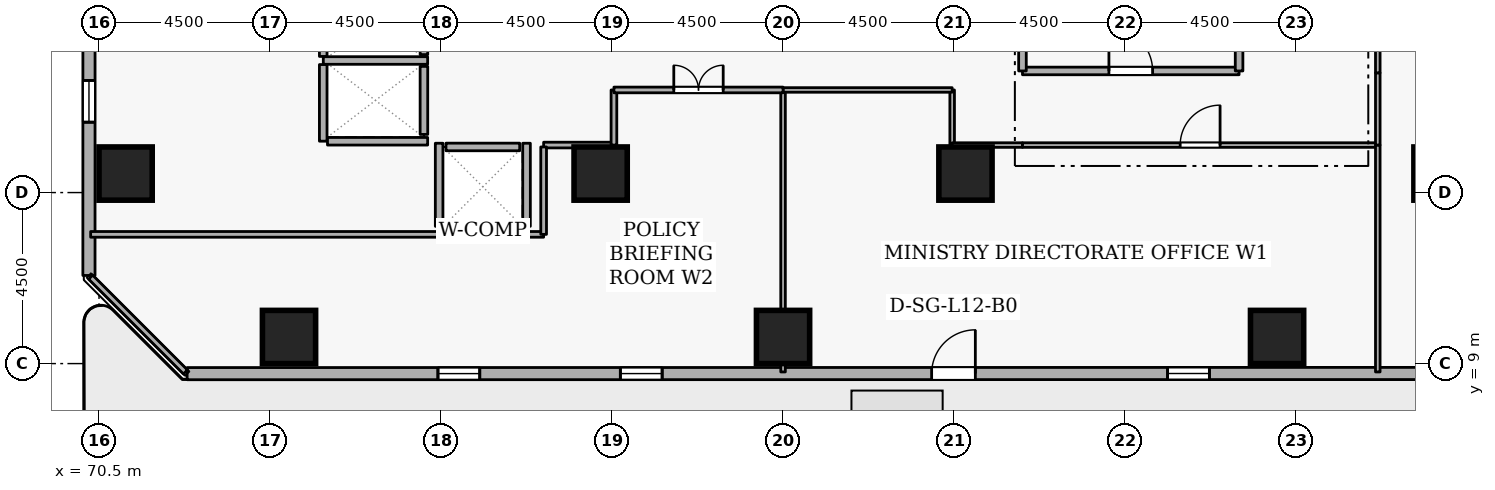
"""IFC4 building model, lengths in metres.
Left out: names, types, materials, properties, quantities, classifications, styles, units other than length and angle.
Written with IfcOpenShell. Run it as: python <this file> out.ifc"""

import sys

from ifc_helpers import new_model, si_unit, direction, frame, frame_2d, origin, origin_2d, place, context, subcontext, project, spatial, rectangle, extrude, element, fill, save


model = new_model("IFC4")
c1 = context("Model", 3, precision=1e-05, world=origin(), true_north=direction((0.0, 1.0)))
c2 = subcontext(c1, "Body", "Model", "MODEL_VIEW")
j1 = project(units=[si_unit("LENGTHUNIT", "METRE"), si_unit("PLANEANGLEUNIT", "RADIAN")], contexts=[c1])
p1 = place(None, origin())
s1 = spatial("IfcSite", under=j1, at=p1, CompositionType="ELEMENT")
p2 = place(p1, origin())
s2 = spatial("IfcBuilding", under=s1, at=p2, CompositionType="ELEMENT")
p3 = place(p2, frame((0.0, 0.0, 49.5)))
s3 = spatial("IfcBuildingStorey", under=s2, at=p3, CompositionType="ELEMENT", Elevation=49.5)
for number, where, z_axis, x_axis in (
    (1, (105.8, 14.0, 0.0), (0.0, 0.0, 1.0), (1.0, 0.0, 0.0)),
    (2, (71.2, 14.0, 0.0), (0.0, 0.0, 1.0), (1.0, 0.0, 0.0)),
    (3, (101.5, 9.7, 0.0), (0.0, 0.0, 1.0), (1.0, 0.0, 0.0)),
    (4, (88.5, 9.7, 0.0), (0.0, 0.0, 1.0), (1.0, 0.0, 0.0)),
    (5, (75.5, 9.7, 0.0), (0.0, 0.0, 1.0), (1.0, 0.0, 0.0)),
    (6, (93.3, 14.0, 0.0), (0.0, 0.0, 1.0), (1.0, 0.0, 0.0)),
    (7, (83.7, 14.0, 0.0), (0.0, 0.0, 1.0), (1.0, 0.0, 0.0)),
):
    element("IfcColumn", number, at=place(p3, frame(where, z_axis=z_axis, x_axis=x_axis)), inside=s3, PredefinedType="COLUMN", context=c2, shape_type="SweptSolid", body=[
        extrude(rectangle(XDim=1.4, YDim=1.4, at=origin_2d()), origin(), (0.0, 0.0, 1.0), 4.2),
    ])
p4 = place(p3, frame((72.819, 8.735, 0.0), z_axis=(0.0, 0.0, 1.0), x_axis=(0.999999988703, 0.000150313265, 0.0)))
e8 = element("IfcWall", 8, at=p4, inside=s3, PredefinedType="STANDARD", context=c2, shape_type="SweptSolid", body=[
    extrude(rectangle(XDim=35.733, YDim=0.32, at=frame_2d((17.866, 0.0))), origin(), (0.0, 0.0, 1.0), 3.3),
])
p5 = place(p4, frame((19.591, 0.0, 0.0)))
e9 = element("IfcOpeningElement", 9, at=p5, cuts=e8, PredefinedType="OPENING", context=c2, shape_type="SweptSolid", body=[
    extrude(rectangle(XDim=1.15, YDim=2.1, at=frame_2d((0.575, 1.05))), frame((0.0, 0.17, 0.0), z_axis=(0.0, -1.0, 0.0), x_axis=(1.0, 0.0, 0.0)), (0.0, 0.0, 1.0), 0.34),
])
p6 = place(p4, frame((6.6, 0.0, 0.72)))
e10 = element("IfcOpeningElement", 10, at=p6, cuts=e8, PredefinedType="OPENING", context=c2, shape_type="SweptSolid", body=[
    extrude(rectangle(XDim=1.1, YDim=1.8, at=frame_2d((0.55, 0.9))), frame((0.0, 0.17, 0.0), z_axis=(0.0, -1.0, 0.0), x_axis=(1.0, 0.0, 0.0)), (0.0, 0.0, 1.0), 0.34),
])
p7 = place(p4, frame((11.4, 0.0, 0.72)))
e11 = element("IfcOpeningElement", 11, at=p7, cuts=e8, PredefinedType="OPENING", context=c2, shape_type="SweptSolid", body=[
    extrude(rectangle(XDim=1.1, YDim=1.8, at=frame_2d((0.55, 0.9))), frame((0.0, 0.17, 0.0), z_axis=(0.0, -1.0, 0.0), x_axis=(1.0, 0.0, 0.0)), (0.0, 0.0, 1.0), 0.34),
])
p8 = place(p4, frame((25.8, 0.0, 0.72)))
e12 = element("IfcOpeningElement", 12, at=p8, cuts=e8, PredefinedType="OPENING", context=c2, shape_type="SweptSolid", body=[
    extrude(rectangle(XDim=1.1, YDim=1.8, at=frame_2d((0.55, 0.9))), frame((0.0, 0.17, 0.0), z_axis=(0.0, -1.0, 0.0), x_axis=(1.0, 0.0, 0.0)), (0.0, 0.0, 1.0), 0.34),
])
p9 = place(p3, frame((70.24, 47.052, 0.0), z_axis=(0.0, 0.0, 1.0), x_axis=(-0.000150313265, -0.999999988703, 0.0)))
e13 = element("IfcWall", 13, at=p9, inside=s3, PredefinedType="STANDARD", context=c2, shape_type="SweptSolid", body=[
    extrude(rectangle(XDim=35.733, YDim=0.32, at=frame_2d((17.866, 0.0))), origin(), (0.0, 0.0, 1.0), 3.3),
])
p10 = place(p9, frame((1.8, 0.0, 0.72)))
e14 = element("IfcOpeningElement", 14, at=p10, cuts=e13, PredefinedType="OPENING", context=c2, shape_type="SweptSolid", body=[
    extrude(rectangle(XDim=1.1, YDim=1.8, at=frame_2d((0.55, 0.9))), frame((0.0, 0.17, 0.0), z_axis=(0.0, -1.0, 0.0), x_axis=(1.0, 0.0, 0.0)), (0.0, 0.0, 1.0), 0.34),
])
p11 = place(p9, frame((11.4, 0.0, 0.72)))
e15 = element("IfcOpeningElement", 15, at=p11, cuts=e13, PredefinedType="OPENING", context=c2, shape_type="SweptSolid", body=[
    extrude(rectangle(XDim=1.1, YDim=1.8, at=frame_2d((0.55, 0.9))), frame((0.0, 0.17, 0.0), z_axis=(0.0, -1.0, 0.0), x_axis=(1.0, 0.0, 0.0)), (0.0, 0.0, 1.0), 0.34),
])
p12 = place(p9, frame((16.2, 0.0, 0.72)))
e16 = element("IfcOpeningElement", 16, at=p12, cuts=e13, PredefinedType="OPENING", context=c2, shape_type="SweptSolid", body=[
    extrude(rectangle(XDim=1.1, YDim=1.8, at=frame_2d((0.55, 0.9))), frame((0.0, 0.17, 0.0), z_axis=(0.0, -1.0, 0.0), x_axis=(1.0, 0.0, 0.0)), (0.0, 0.0, 1.0), 0.34),
])
p13 = place(p9, frame((25.8, 0.0, 0.72)))
e17 = element("IfcOpeningElement", 17, at=p13, cuts=e13, PredefinedType="OPENING", context=c2, shape_type="SweptSolid", body=[
    extrude(rectangle(XDim=1.1, YDim=1.8, at=frame_2d((0.55, 0.9))), frame((0.0, 0.17, 0.0), z_axis=(0.0, -1.0, 0.0), x_axis=(1.0, 0.0, 0.0)), (0.0, 0.0, 1.0), 0.34),
])
p14 = place(p9, frame((30.6, 0.0, 0.72)))
e18 = element("IfcOpeningElement", 18, at=p14, cuts=e13, PredefinedType="OPENING", context=c2, shape_type="SweptSolid", body=[
    extrude(rectangle(XDim=1.1, YDim=1.8, at=frame_2d((0.55, 0.9))), frame((0.0, 0.17, 0.0), z_axis=(0.0, -1.0, 0.0), x_axis=(1.0, 0.0, 0.0)), (0.0, 0.0, 1.0), 0.34),
])
p15 = place(p3, frame((79.05, 17.13, 0.0), z_axis=(0.0, 0.0, 1.0), x_axis=(0.0, 1.0, 0.0)))
e19 = element("IfcWall", 19, at=p15, inside=s3, PredefinedType="STANDARD", context=c2, shape_type="SweptSolid", body=[
    extrude(rectangle(XDim=1.74, YDim=0.2, at=frame_2d((0.87, 0.0))), origin(), (0.0, 0.0, 1.0), 3.94),
])
p16 = place(p3, frame((79.05, 15.03, 0.0), z_axis=(0.0, 0.0, 1.0), x_axis=(0.0, 1.0, 0.0)))
e20 = element("IfcWall", 20, at=p16, inside=s3, PredefinedType="STANDARD", context=c2, shape_type="SweptSolid", body=[
    extrude(rectangle(XDim=1.79, YDim=0.2, at=frame_2d((0.895, 0.0))), origin(), (0.0, 0.0, 1.0), 3.94),
])
p17 = place(p3, frame((79.63, 14.7, 0.0), z_axis=(0.0, 0.0, 1.0), x_axis=(1.0, 0.0, 0.0)))
e21 = element("IfcWall", 21, at=p17, inside=s3, PredefinedType="STANDARD", context=c2, shape_type="SweptSolid", body=[
    extrude(rectangle(XDim=1.94, YDim=0.2, at=frame_2d((0.97, 0.0))), origin(), (0.0, 0.0, 1.0), 3.94),
])
p18 = place(p3, frame((76.402, 16.975, 0.0), z_axis=(0.0, 0.0, 1.0), x_axis=(1.0, 0.0, 0.0)))
e22 = element("IfcWall", 22, at=p18, inside=s3, PredefinedType="STANDARD", context=c2, shape_type="SweptSolid", body=[
    extrude(rectangle(XDim=2.746, YDim=0.2, at=frame_2d((1.373, 0.0))), origin(), (0.0, 0.0, 1.0), 3.94),
])
p19 = place(p3, frame((76.4, 14.852, 0.0), z_axis=(0.0, 0.0, 1.0), x_axis=(0.0, 1.0, 0.0)))
e23 = element("IfcWall", 23, at=p19, inside=s3, PredefinedType="STANDARD", context=c2, shape_type="SweptSolid", body=[
    extrude(rectangle(XDim=2.016, YDim=0.2, at=frame_2d((1.008, 0.0))), origin(), (0.0, 0.0, 1.0), 3.94),
])
p20 = place(p3, frame((76.4, 17.082, 0.0), z_axis=(0.0, 0.0, 1.0), x_axis=(0.0, 1.0, 0.0)))
e24 = element("IfcWall", 24, at=p20, inside=s3, PredefinedType="STANDARD", context=c2, shape_type="SweptSolid", body=[
    extrude(rectangle(XDim=1.856, YDim=0.2, at=frame_2d((0.928, 0.0))), origin(), (0.0, 0.0, 1.0), 3.94),
])
p21 = place(p3, frame((76.512, 14.85, 0.0), z_axis=(0.0, 0.0, 1.0), x_axis=(1.0, 0.0, 0.0)))
e25 = element("IfcWall", 25, at=p21, inside=s3, PredefinedType="STANDARD", context=c2, shape_type="SweptSolid", body=[
    extrude(rectangle(XDim=2.636, YDim=0.2, at=frame_2d((1.318, 0.0))), origin(), (0.0, 0.0, 1.0), 3.94),
])
p22 = place(p3, frame((79.452, 12.5, 0.0), z_axis=(0.0, 0.0, 1.0), x_axis=(1.0, 0.0, 0.0)))
e26 = element("IfcWall", 26, at=p22, inside=s3, PredefinedType="STANDARD", context=c2, shape_type="SweptSolid", body=[
    extrude(rectangle(XDim=2.296, YDim=0.2, at=frame_2d((1.148, 0.0))), origin(), (0.0, 0.0, 1.0), 3.94),
])
for number, where, z_axis, x_axis in (
    (27, (81.75, 12.612, 0.0), (0.0, 0.0, 1.0), (0.0, 1.0, 0.0)),
    (28, (79.45, 12.612, 0.0), (0.0, 0.0, 1.0), (0.0, 1.0, 0.0)),
):
    element("IfcWall", number, at=place(p3, frame(where, z_axis=z_axis, x_axis=x_axis)), inside=s3, PredefinedType="STANDARD", context=c2, shape_type="SweptSolid", body=[
        extrude(rectangle(XDim=2.186, YDim=0.2, at=frame_2d((1.093, 0.0))), origin(), (0.0, 0.0, 1.0), 3.94),
    ])
p23 = place(p3, frame((94.8, 16.7, 0.0), z_axis=(0.0, 0.0, 1.0), x_axis=(1.0, 0.0, 0.0)))
e29 = element("IfcWall", 29, at=p23, inside=s3, PredefinedType="STANDARD", context=c2, shape_type="SweptSolid", body=[
    extrude(rectangle(XDim=5.7, YDim=0.2, at=frame_2d((2.85, 0.0))), origin(), (0.0, 0.0, 1.0), 3.94),
])
p24 = place(p23, frame((2.275, 0.0, 0.0)))
e30 = element("IfcOpeningElement", 30, at=p24, cuts=e29, PredefinedType="OPENING", context=c2, shape_type="SweptSolid", body=[
    extrude(rectangle(XDim=1.15, YDim=2.1, at=frame_2d((0.575, 1.05))), frame((0.0, 0.11, 0.0), z_axis=(0.0, -1.0, 0.0), x_axis=(1.0, 0.0, 0.0)), (0.0, 0.0, 1.0), 0.22),
])
for number, where, z_axis, x_axis in (
    (31, (100.5, 16.7, 0.0), (0.0, 0.0, 1.0), (0.0, 1.0, 0.0)),
    (32, (94.8, 19.2, 0.0), (0.0, 0.0, 1.0), (0.0, -1.0, 0.0)),
):
    element("IfcWall", number, at=place(p3, frame(where, z_axis=z_axis, x_axis=x_axis)), inside=s3, PredefinedType="STANDARD", context=c2, shape_type="SweptSolid", body=[
        extrude(rectangle(XDim=2.5, YDim=0.2, at=frame_2d((1.25, 0.0))), origin(), (0.0, 0.0, 1.0), 3.94),
    ])
p25 = place(p3, frame((92.95, 16.2, 0.0), z_axis=(0.0, 0.0, 1.0), x_axis=(0.0, -1.0, 0.0)))
e33 = element("IfcWall", 33, at=p25, inside=s3, PredefinedType="PARTITIONING", context=c2, shape_type="SweptSolid", body=[
    extrude(rectangle(XDim=1.45, YDim=0.12, at=frame_2d((0.725, 0.0))), origin(), (0.0, 0.0, 1.0), 3.94),
])
p26 = place(p3, frame((92.95, 14.75, 0.0), z_axis=(0.0, 0.0, 1.0), x_axis=(1.0, 0.0, 0.0)))
e34 = element("IfcWall", 34, at=p26, inside=s3, PredefinedType="PARTITIONING", context=c2, shape_type="SweptSolid", body=[
    extrude(rectangle(XDim=1.85, YDim=0.12, at=frame_2d((0.925, 0.0))), origin(), (0.0, 0.0, 1.0), 3.94),
])
p27 = place(p3, frame((94.8, 14.75, 0.0), z_axis=(0.0, 0.0, 1.0), x_axis=(1.0, 0.0, 0.0)))
e35 = element("IfcWall", 35, at=p27, inside=s3, PredefinedType="PARTITIONING", context=c2, shape_type="SweptSolid", body=[
    extrude(rectangle(XDim=9.35, YDim=0.12, at=frame_2d((4.675, 0.0))), origin(), (0.0, 0.0, 1.0), 3.94),
])
p28 = place(p27, frame((4.15, 0.0, 0.0)))
e36 = element("IfcOpeningElement", 36, at=p28, cuts=e35, PredefinedType="OPENING", context=c2, shape_type="SweptSolid", body=[
    extrude(rectangle(XDim=1.05, YDim=2.1, at=frame_2d((0.525, 1.05))), frame((0.0, 0.07, 0.0), z_axis=(0.0, -1.0, 0.0), x_axis=(1.0, 0.0, 0.0)), (0.0, 0.0, 1.0), 0.14),
])
p29 = place(p3, frame((104.15, 14.75, 0.0), z_axis=(0.0, 0.0, 1.0), x_axis=(0.0, -1.0, 0.0)))
e37 = element("IfcWall", 37, at=p29, inside=s3, PredefinedType="PARTITIONING", context=c2, shape_type="SweptSolid", body=[
    extrude(rectangle(XDim=5.97, YDim=0.12, at=frame_2d((2.985, 0.0))), origin(), (0.0, 0.0, 1.0), 3.94),
])
p30 = place(p3, frame((88.5, 8.78, 0.0), z_axis=(0.0, 0.0, 1.0), x_axis=(0.0, 1.0, 0.0)))
e38 = element("IfcWall", 38, at=p30, inside=s3, PredefinedType="PARTITIONING", context=c2, shape_type="SweptSolid", body=[
    extrude(rectangle(XDim=7.42, YDim=0.12, at=frame_2d((3.71, 0.0))), origin(), (0.0, 0.0, 1.0), 3.532),
])
p31 = place(p3, frame((88.5, 16.2, 0.0), z_axis=(0.0, 0.0, 1.0), x_axis=(1.0, 0.0, 0.0)))
e39 = element("IfcWall", 39, at=p31, inside=s3, PredefinedType="PARTITIONING", context=c2, shape_type="SweptSolid", body=[
    extrude(rectangle(XDim=4.45, YDim=0.12, at=frame_2d((2.225, 0.0))), origin(), (0.0, 0.0, 1.0), 3.94),
])
p32 = place(p3, frame((82.2, 14.75, 0.0), z_axis=(0.0, 0.0, 1.0), x_axis=(1.0, 0.0, 0.0)))
e40 = element("IfcWall", 40, at=p32, inside=s3, PredefinedType="PARTITIONING", context=c2, shape_type="SweptSolid", body=[
    extrude(rectangle(XDim=1.85, YDim=0.15, at=frame_2d((0.925, 0.0))), origin(), (0.0, 0.0, 1.0), 3.94),
])
p33 = place(p3, frame((84.05, 14.75, 0.0), z_axis=(0.0, 0.0, 1.0), x_axis=(0.0, 1.0, 0.0)))
e41 = element("IfcWall", 41, at=p33, inside=s3, PredefinedType="PARTITIONING", context=c2, shape_type="SweptSolid", body=[
    extrude(rectangle(XDim=1.45, YDim=0.15, at=frame_2d((0.725, 0.0))), origin(), (0.0, 0.0, 1.0), 3.94),
])
p34 = place(p3, frame((84.05, 16.2, 0.0), z_axis=(0.0, 0.0, 1.0), x_axis=(1.0, 0.0, 0.0)))
e42 = element("IfcWall", 42, at=p34, inside=s3, PredefinedType="PARTITIONING", context=c2, shape_type="SweptSolid", body=[
    extrude(rectangle(XDim=4.45, YDim=0.15, at=frame_2d((2.225, 0.0))), origin(), (0.0, 0.0, 1.0), 3.94),
])
p35 = place(p34, frame((1.575, 0.0, 0.0)))
e43 = element("IfcOpeningElement", 43, at=p35, cuts=e42, PredefinedType="OPENING", context=c2, shape_type="SweptSolid", body=[
    extrude(rectangle(XDim=1.3, YDim=2.12, at=frame_2d((0.65, 1.06))), frame((0.0, 0.085, 0.0), z_axis=(0.0, -1.0, 0.0), x_axis=(1.0, 0.0, 0.0)), (0.0, 0.0, 1.0), 0.17),
])
p36 = place(p3, frame((72.775, 8.78, 0.0), z_axis=(0.0, 0.0, 1.0), x_axis=(-0.707106781187, 0.707106781187, 0.0)))
e44 = element("IfcWall", 44, at=p36, inside=s3, PredefinedType="PARTITIONING", context=c2, shape_type="SweptSolid", body=[
    extrude(rectangle(XDim=3.528, YDim=0.15, at=frame_2d((1.764, 0.0))), origin(), (0.0, 0.0, 1.0), 3.94),
])
p37 = place(p3, frame((70.28, 12.4, 0.0), z_axis=(0.0, 0.0, 1.0), x_axis=(1.0, 0.0, 0.0)))
e45 = element("IfcWall", 45, at=p37, inside=s3, PredefinedType="PARTITIONING", context=c2, shape_type="SweptSolid", body=[
    extrude(rectangle(XDim=9.172, YDim=0.15, at=frame_2d((4.586, 0.0))), origin(), (0.0, 0.0, 1.0), 3.94),
])
p38 = place(p3, frame((81.748, 12.4, 0.0), z_axis=(0.0, 0.0, 1.0), x_axis=(1.0, 0.0, 0.0)))
e46 = element("IfcWall", 46, at=p38, inside=s3, PredefinedType="PARTITIONING", context=c2, shape_type="SweptSolid", body=[
    extrude(rectangle(XDim=0.452, YDim=0.15, at=frame_2d((0.226, 0.0))), origin(), (0.0, 0.0, 1.0), 3.94),
])
p39 = place(p3, frame((82.2, 12.4, 0.0), z_axis=(0.0, 0.0, 1.0), x_axis=(0.0, 1.0, 0.0)))
e47 = element("IfcWall", 47, at=p39, inside=s3, PredefinedType="PARTITIONING", context=c2, shape_type="SweptSolid", body=[
    extrude(rectangle(XDim=2.3, YDim=0.15, at=frame_2d((1.15, 0.0))), origin(), (0.0, 0.0, 1.0), 3.94),
])
p40 = place(p3, frame((104.15, 14.75, 0.0), z_axis=(0.0, 0.0, 1.0), x_axis=(0.0, 1.0, 0.0)))
e48 = element("IfcWall", 48, at=p40, inside=s3, PredefinedType="PARTITIONING", context=c2, shape_type="SweptSolid", body=[
    extrude(rectangle(XDim=1.9, YDim=0.12, at=frame_2d((0.95, 0.0))), origin(), (0.0, 0.0, 1.0), 3.94),
])
p41 = place(p3, frame((104.15, 16.65, 0.0), z_axis=(0.0, 0.0, 1.0), x_axis=(0.0, 1.0, 0.0)))
e49 = element("IfcWall", 49, at=p41, inside=s3, PredefinedType="PARTITIONING", context=c2, shape_type="SweptSolid", body=[
    extrude(rectangle(XDim=10.35, YDim=0.12, at=frame_2d((5.175, 0.0))), origin(), (0.0, 0.0, 1.0), 3.94),
])
p42 = place(p41, frame((4.65, 0.0, 0.0)))
e50 = element("IfcOpeningElement", 50, at=p42, cuts=e49, PredefinedType="OPENING", context=c2, shape_type="SweptSolid", body=[
    extrude(rectangle(XDim=1.05, YDim=2.1, at=frame_2d((0.525, 1.05))), frame((0.0, 0.07, 0.0), z_axis=(0.0, -1.0, 0.0), x_axis=(1.0, 0.0, 0.0)), (0.0, 0.0, 1.0), 0.14),
])
p43 = place(p5, origin())
e51 = element("IfcDoor", 51, at=p43, inside=s3, OperationType="SINGLE_SWING_RIGHT", PredefinedType="DOOR", context=c2, shape_type="SweptSolid", body=[
    extrude(rectangle(XDim=1.15, YDim=2.1, at=frame_2d((0.575, 1.05))), frame((0.0, 0.025, 0.0), z_axis=(0.0, -1.0, 0.0), x_axis=(1.0, 0.0, 0.0)), (0.0, 0.0, 1.0), 0.05),
])
fill(e9, e51)
p44 = place(p6, origin())
e52 = element("IfcWindow", 52, at=p44, inside=s3, PartitioningType="SINGLE_PANEL", PredefinedType="WINDOW", context=c2, shape_type="SweptSolid", body=[
    extrude(rectangle(XDim=1.1, YDim=1.8, at=frame_2d((0.55, 0.9))), frame((0.0, 0.03, 0.0), z_axis=(0.0, -1.0, 0.0), x_axis=(1.0, 0.0, 0.0)), (0.0, 0.0, 1.0), 0.06),
])
fill(e10, e52)
p45 = place(p7, origin())
e53 = element("IfcWindow", 53, at=p45, inside=s3, PartitioningType="SINGLE_PANEL", PredefinedType="WINDOW", context=c2, shape_type="SweptSolid", body=[
    extrude(rectangle(XDim=1.1, YDim=1.8, at=frame_2d((0.55, 0.9))), frame((0.0, 0.03, 0.0), z_axis=(0.0, -1.0, 0.0), x_axis=(1.0, 0.0, 0.0)), (0.0, 0.0, 1.0), 0.06),
])
fill(e11, e53)
p46 = place(p8, origin())
e54 = element("IfcWindow", 54, at=p46, inside=s3, PartitioningType="SINGLE_PANEL", PredefinedType="WINDOW", context=c2, shape_type="SweptSolid", body=[
    extrude(rectangle(XDim=1.1, YDim=1.8, at=frame_2d((0.55, 0.9))), frame((0.0, 0.03, 0.0), z_axis=(0.0, -1.0, 0.0), x_axis=(1.0, 0.0, 0.0)), (0.0, 0.0, 1.0), 0.06),
])
fill(e12, e54)
p47 = place(p14, origin())
e55 = element("IfcWindow", 55, at=p47, inside=s3, PartitioningType="SINGLE_PANEL", PredefinedType="WINDOW", context=c2, shape_type="SweptSolid", body=[
    extrude(rectangle(XDim=1.1, YDim=1.8, at=frame_2d((0.55, 0.9))), frame((0.0, 0.03, 0.0), z_axis=(0.0, -1.0, 0.0), x_axis=(1.0, 0.0, 0.0)), (0.0, 0.0, 1.0), 0.06),
])
fill(e18, e55)
p48 = place(p24, origin())
e56 = element("IfcDoor", 56, at=p48, inside=s3, OperationType="SINGLE_SWING_LEFT", PredefinedType="DOOR", context=c2, shape_type="SweptSolid", body=[
    extrude(rectangle(XDim=1.15, YDim=2.1, at=frame_2d((0.575, 1.05))), frame((0.0, 0.025, 0.0), z_axis=(0.0, -1.0, 0.0), x_axis=(1.0, 0.0, 0.0)), (0.0, 0.0, 1.0), 0.05),
])
fill(e30, e56)
p49 = place(p28, origin())
e57 = element("IfcDoor", 57, at=p49, inside=s3, OperationType="SINGLE_SWING_RIGHT", PredefinedType="DOOR", context=c2, shape_type="SweptSolid", body=[
    extrude(rectangle(XDim=1.05, YDim=2.1, at=frame_2d((0.525, 1.05))), frame((0.0, 0.025, 0.0), z_axis=(0.0, -1.0, 0.0), x_axis=(1.0, 0.0, 0.0)), (0.0, 0.0, 1.0), 0.05),
])
fill(e36, e57)
p50 = place(p35, origin())
e58 = element("IfcDoor", 58, at=p50, inside=s3, OperationType="DOUBLE_DOOR_SINGLE_SWING", PredefinedType="DOOR", context=c2, shape_type="SweptSolid", body=[
    extrude(rectangle(XDim=1.3, YDim=2.12, at=frame_2d((0.65, 1.06))), frame((0.0, 0.025, 0.0), z_axis=(0.0, -1.0, 0.0), x_axis=(1.0, 0.0, 0.0)), (0.0, 0.0, 1.0), 0.05),
])
fill(e43, e58)
save(model, sys.argv[1])
